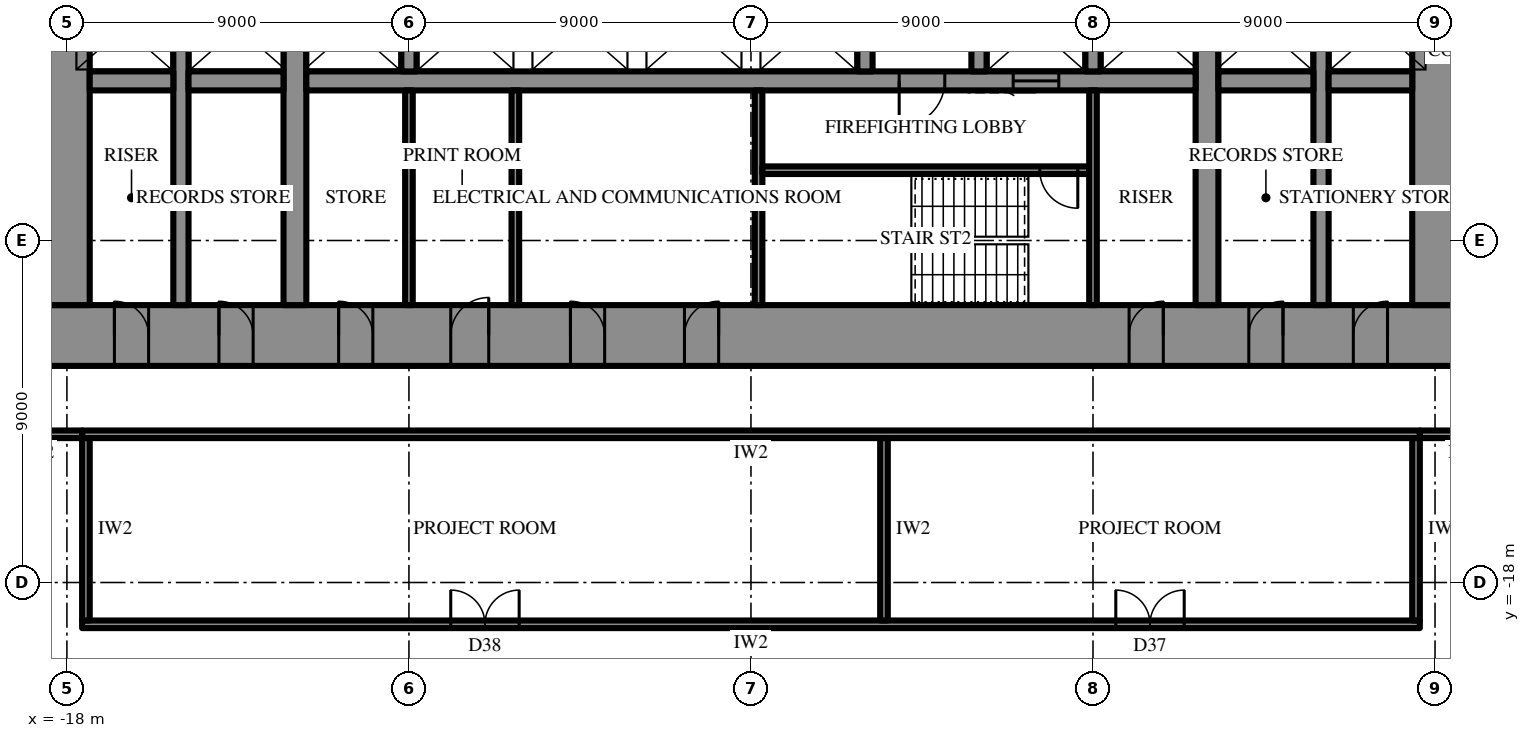
"""IFC4 building model, lengths in metres.
Left out: names, types, materials, properties, quantities, classifications, styles, units other than length and angle.
Written with IfcOpenShell. Run it as: python <this file> out.ifc"""

import sys

from ifc_helpers import new_model, si_unit, direction, frame, frame_2d, origin, place, context, subcontext, project, spatial, rectangle, extrude, element, fill, save


model = new_model("IFC4")
c1 = context("Model", 3, precision=1e-05, world=origin(), true_north=direction((0.0, 1.0)))
c2 = subcontext(c1, "Body", "Model", "MODEL_VIEW")
j1 = project(units=[si_unit("LENGTHUNIT", "METRE"), si_unit("PLANEANGLEUNIT", "RADIAN")], contexts=[c1])
p1 = place(None, origin())
s1 = spatial("IfcSite", under=j1, at=p1, CompositionType="ELEMENT")
p2 = place(p1, origin())
s2 = spatial("IfcBuilding", under=s1, at=p2, CompositionType="ELEMENT")
p3 = place(p2, frame((0.0, 0.0, 23.5)))
s3 = spatial("IfcBuildingStorey", under=s2, at=p3, CompositionType="ELEMENT", Elevation=23.5)
p4 = place(p3, frame((18.6, -11.5, 0.0), z_axis=(0.0, 0.0, 1.0), x_axis=(-1.0, 0.0, 0.0)))
e1 = element("IfcWall", 1, at=p4, inside=s3, PredefinedType="SHEAR", context=c2, shape_type="SweptSolid", body=[
    extrude(rectangle(XDim=37.2, YDim=1.6, at=frame_2d((18.6, 0.0))), origin(), (0.0, 0.0, 1.0), 4.2),
])
p5 = place(p4, frame((19.45, 0.0, 0.0)))
e2 = element("IfcOpeningElement", 2, at=p5, cuts=e1, PredefinedType="OPENING", context=c2, shape_type="SweptSolid", body=[
    extrude(rectangle(XDim=0.9, YDim=2.2, at=frame_2d((0.45, 1.1))), frame((0.0, 0.81, 0.0), z_axis=(0.0, -1.0, 0.0), x_axis=(1.0, 0.0, 0.0)), (0.0, 0.0, 1.0), 1.62),
])
p6 = place(p4, frame((22.45, 0.0, 0.0)))
e3 = element("IfcOpeningElement", 3, at=p6, cuts=e1, PredefinedType="OPENING", context=c2, shape_type="SweptSolid", body=[
    extrude(rectangle(XDim=0.9, YDim=2.2, at=frame_2d((0.45, 1.1))), frame((0.0, 0.81, 0.0), z_axis=(0.0, -1.0, 0.0), x_axis=(1.0, 0.0, 0.0)), (0.0, 0.0, 1.0), 1.62),
])
p7 = place(p4, frame((25.5, 0.0, 0.0)))
e4 = element("IfcOpeningElement", 4, at=p7, cuts=e1, PredefinedType="OPENING", context=c2, shape_type="SweptSolid", body=[
    extrude(rectangle(XDim=1.0, YDim=2.2, at=frame_2d((0.5, 1.1))), frame((0.0, 0.81, 0.0), z_axis=(0.0, -1.0, 0.0), x_axis=(1.0, 0.0, 0.0)), (0.0, 0.0, 1.0), 1.62),
])
p8 = place(p4, frame((1.85, 0.0, 0.0)))
e5 = element("IfcOpeningElement", 5, at=p8, cuts=e1, PredefinedType="OPENING", context=c2, shape_type="SweptSolid", body=[
    extrude(rectangle(XDim=0.9, YDim=2.2, at=frame_2d((0.45, 1.1))), frame((0.0, 0.81, 0.0), z_axis=(0.0, -1.0, 0.0), x_axis=(1.0, 0.0, 0.0)), (0.0, 0.0, 1.0), 1.62),
])
p9 = place(p4, frame((4.6, 0.0, 0.0)))
e6 = element("IfcOpeningElement", 6, at=p9, cuts=e1, PredefinedType="OPENING", context=c2, shape_type="SweptSolid", body=[
    extrude(rectangle(XDim=0.9, YDim=2.2, at=frame_2d((0.45, 1.1))), frame((0.0, 0.81, 0.0), z_axis=(0.0, -1.0, 0.0), x_axis=(1.0, 0.0, 0.0)), (0.0, 0.0, 1.0), 1.62),
])
p10 = place(p4, frame((7.75, 0.0, 0.0)))
e7 = element("IfcOpeningElement", 7, at=p10, cuts=e1, PredefinedType="OPENING", context=c2, shape_type="SweptSolid", body=[
    extrude(rectangle(XDim=0.9, YDim=2.2, at=frame_2d((0.45, 1.1))), frame((0.0, 0.81, 0.0), z_axis=(0.0, -1.0, 0.0), x_axis=(1.0, 0.0, 0.0)), (0.0, 0.0, 1.0), 1.62),
])
p11 = place(p4, frame((28.55, 0.0, 0.0)))
e8 = element("IfcOpeningElement", 8, at=p11, cuts=e1, PredefinedType="OPENING", context=c2, shape_type="SweptSolid", body=[
    extrude(rectangle(XDim=0.9, YDim=2.2, at=frame_2d((0.45, 1.1))), frame((0.0, 0.81, 0.0), z_axis=(0.0, -1.0, 0.0), x_axis=(1.0, 0.0, 0.0)), (0.0, 0.0, 1.0), 1.62),
])
p12 = place(p4, frame((31.7, 0.0, 0.0)))
e9 = element("IfcOpeningElement", 9, at=p12, cuts=e1, PredefinedType="OPENING", context=c2, shape_type="SweptSolid", body=[
    extrude(rectangle(XDim=0.9, YDim=2.2, at=frame_2d((0.45, 1.1))), frame((0.0, 0.81, 0.0), z_axis=(0.0, -1.0, 0.0), x_axis=(1.0, 0.0, 0.0)), (0.0, 0.0, 1.0), 1.62),
])
p13 = place(p4, frame((34.45, 0.0, 0.0)))
e10 = element("IfcOpeningElement", 10, at=p13, cuts=e1, PredefinedType="OPENING", context=c2, shape_type="SweptSolid", body=[
    extrude(rectangle(XDim=0.9, YDim=2.2, at=frame_2d((0.45, 1.1))), frame((0.0, 0.81, 0.0), z_axis=(0.0, -1.0, 0.0), x_axis=(1.0, 0.0, 0.0)), (0.0, 0.0, 1.0), 1.62),
])
p14 = place(p3, frame((18.0, -10.7, 0.0), z_axis=(0.0, 0.0, 1.0), x_axis=(0.0, 1.0, 0.0)))
e11 = element("IfcWall", 11, at=p14, inside=s3, PredefinedType="SHEAR", context=c2, shape_type="SweptSolid", body=[
    extrude(rectangle(XDim=21.4, YDim=1.2, at=frame_2d((10.7, 0.0))), origin(), (0.0, 0.0, 1.0), 4.2),
])
p15 = place(p14, frame((9.8, 0.0, 0.0)))
e12 = element("IfcOpeningElement", 12, at=p15, cuts=e11, PredefinedType="OPENING", context=c2, shape_type="SweptSolid", body=[
    extrude(rectangle(XDim=1.8, YDim=2.4, at=frame_2d((0.9, 1.2))), frame((0.0, 0.61, 0.0), z_axis=(0.0, -1.0, 0.0), x_axis=(1.0, 0.0, 0.0)), (0.0, 0.0, 1.0), 1.22),
])
p16 = place(p3, frame((-18.0, 10.7, 0.0), z_axis=(0.0, 0.0, 1.0), x_axis=(0.0, -1.0, 0.0)))
e13 = element("IfcWall", 13, at=p16, inside=s3, PredefinedType="SHEAR", context=c2, shape_type="SweptSolid", body=[
    extrude(rectangle(XDim=21.4, YDim=1.2, at=frame_2d((10.7, 0.0))), origin(), (0.0, 0.0, 1.0), 4.2),
])
p17 = place(p16, frame((9.8, 0.0, 0.0)))
e14 = element("IfcOpeningElement", 14, at=p17, cuts=e13, PredefinedType="OPENING", context=c2, shape_type="SweptSolid", body=[
    extrude(rectangle(XDim=1.8, YDim=2.4, at=frame_2d((0.9, 1.2))), frame((0.0, 0.61, 0.0), z_axis=(0.0, -1.0, 0.0), x_axis=(1.0, 0.0, 0.0)), (0.0, 0.0, 1.0), 1.22),
])
p18 = place(p3, frame((12.0, -10.7, 0.0), z_axis=(0.0, 0.0, 1.0), x_axis=(0.0, 1.0, 0.0)))
e15 = element("IfcWall", 15, at=p18, inside=s3, PredefinedType="SHEAR", context=c2, shape_type="SweptSolid", body=[
    extrude(rectangle(XDim=21.4, YDim=0.6, at=frame_2d((10.7, 0.0))), origin(), (0.0, 0.0, 1.0), 4.2),
])
p19 = place(p18, frame((9.8, 0.0, 0.0)))
e16 = element("IfcOpeningElement", 16, at=p19, cuts=e15, PredefinedType="OPENING", context=c2, shape_type="SweptSolid", body=[
    extrude(rectangle(XDim=1.8, YDim=2.4, at=frame_2d((0.9, 1.2))), frame((0.0, 0.31, 0.0), z_axis=(0.0, -1.0, 0.0), x_axis=(1.0, 0.0, 0.0)), (0.0, 0.0, 1.0), 0.62),
])
p20 = place(p3, frame((-12.0, -10.7, 0.0), z_axis=(0.0, 0.0, 1.0), x_axis=(0.0, 1.0, 0.0)))
e17 = element("IfcWall", 17, at=p20, inside=s3, PredefinedType="SHEAR", context=c2, shape_type="SweptSolid", body=[
    extrude(rectangle(XDim=21.4, YDim=0.6, at=frame_2d((10.7, 0.0))), origin(), (0.0, 0.0, 1.0), 4.2),
])
p21 = place(p20, frame((9.8, 0.0, 0.0)))
e18 = element("IfcOpeningElement", 18, at=p21, cuts=e17, PredefinedType="OPENING", context=c2, shape_type="SweptSolid", body=[
    extrude(rectangle(XDim=1.8, YDim=2.4, at=frame_2d((0.9, 1.2))), frame((0.0, 0.31, 0.0), z_axis=(0.0, -1.0, 0.0), x_axis=(1.0, 0.0, 0.0)), (0.0, 0.0, 1.0), 0.62),
])
p22 = place(p3, frame((15.0, -10.7, 0.0), z_axis=(0.0, 0.0, 1.0), x_axis=(0.0, 1.0, 0.0)))
e19 = element("IfcWall", 19, at=p22, inside=s3, PredefinedType="SHEAR", context=c2, shape_type="SweptSolid", body=[
    extrude(rectangle(XDim=21.4, YDim=0.4, at=frame_2d((10.7, 0.0))), origin(), (0.0, 0.0, 1.0), 4.2),
])
p23 = place(p22, frame((9.8, 0.0, 0.0)))
e20 = element("IfcOpeningElement", 20, at=p23, cuts=e19, PredefinedType="OPENING", context=c2, shape_type="SweptSolid", body=[
    extrude(rectangle(XDim=1.8, YDim=2.4, at=frame_2d((0.9, 1.2))), frame((0.0, 0.21, 0.0), z_axis=(0.0, -1.0, 0.0), x_axis=(1.0, 0.0, 0.0)), (0.0, 0.0, 1.0), 0.42),
])
p24 = place(p3, frame((-15.0, -10.7, 0.0), z_axis=(0.0, 0.0, 1.0), x_axis=(0.0, 1.0, 0.0)))
e21 = element("IfcWall", 21, at=p24, inside=s3, PredefinedType="SHEAR", context=c2, shape_type="SweptSolid", body=[
    extrude(rectangle(XDim=21.4, YDim=0.4, at=frame_2d((10.7, 0.0))), origin(), (0.0, 0.0, 1.0), 4.2),
])
p25 = place(p24, frame((9.8, 0.0, 0.0)))
e22 = element("IfcOpeningElement", 22, at=p25, cuts=e21, PredefinedType="OPENING", context=c2, shape_type="SweptSolid", body=[
    extrude(rectangle(XDim=1.8, YDim=2.4, at=frame_2d((0.9, 1.2))), frame((0.0, 0.21, 0.0), z_axis=(0.0, -1.0, 0.0), x_axis=(1.0, 0.0, 0.0)), (0.0, 0.0, 1.0), 0.42),
])
p26 = place(p3, frame((17.4, -4.8, 0.0), z_axis=(0.0, 0.0, 1.0), x_axis=(-1.0, 0.0, 0.0)))
e23 = element("IfcWall", 23, at=p26, inside=s3, PredefinedType="SHEAR", context=c2, shape_type="SweptSolid", body=[
    extrude(rectangle(XDim=2.2, YDim=0.5, at=frame_2d((1.1, 0.0))), origin(), (0.0, 0.0, 1.0), 4.2),
])
p27 = place(p3, frame((14.8, -4.8, 0.0), z_axis=(0.0, 0.0, 1.0), x_axis=(-1.0, 0.0, 0.0)))
e24 = element("IfcWall", 24, at=p27, inside=s3, PredefinedType="SHEAR", context=c2, shape_type="SweptSolid", body=[
    extrude(rectangle(XDim=2.5, YDim=0.5, at=frame_2d((1.25, 0.0))), origin(), (0.0, 0.0, 1.0), 4.2),
])
p28 = place(p3, frame((11.7, -4.8, 0.0), z_axis=(0.0, 0.0, 1.0), x_axis=(-1.0, 0.0, 0.0)))
e25 = element("IfcWall", 25, at=p28, inside=s3, PredefinedType="SHEAR", context=c2, shape_type="SweptSolid", body=[
    extrude(rectangle(XDim=23.4, YDim=0.5, at=frame_2d((11.7, 0.0))), origin(), (0.0, 0.0, 1.0), 4.2),
])
p29 = place(p28, frame((6.6, 0.0, 0.0)))
e26 = element("IfcOpeningElement", 26, at=p29, cuts=e25, PredefinedType="OPENING", context=c2, shape_type="SweptSolid", body=[
    extrude(rectangle(XDim=1.2, YDim=2.2, at=frame_2d((0.6, 1.1))), frame((0.0, 0.26, 0.0), z_axis=(0.0, -1.0, 0.0), x_axis=(1.0, 0.0, 0.0)), (0.0, 0.0, 1.0), 0.52),
])
p30 = place(p28, frame((3.6, 0.0, 0.0)))
e27 = element("IfcOpeningElement", 27, at=p30, cuts=e25, PredefinedType="OPENING", context=c2, shape_type="SweptSolid", body=[
    extrude(rectangle(XDim=1.2, YDim=2.2, at=frame_2d((0.6, 1.1))), frame((0.0, 0.26, 0.0), z_axis=(0.0, -1.0, 0.0), x_axis=(1.0, 0.0, 0.0)), (0.0, 0.0, 1.0), 0.52),
])
p31 = place(p3, frame((-12.3, -4.8, 0.0), z_axis=(0.0, 0.0, 1.0), x_axis=(-1.0, 0.0, 0.0)))
e28 = element("IfcWall", 28, at=p31, inside=s3, PredefinedType="SHEAR", context=c2, shape_type="SweptSolid", body=[
    extrude(rectangle(XDim=2.5, YDim=0.5, at=frame_2d((1.25, 0.0))), origin(), (0.0, 0.0, 1.0), 4.2),
])
p32 = place(p3, frame((-15.2, -4.8, 0.0), z_axis=(0.0, 0.0, 1.0), x_axis=(-1.0, 0.0, 0.0)))
e29 = element("IfcWall", 29, at=p32, inside=s3, PredefinedType="SHEAR", context=c2, shape_type="SweptSolid", body=[
    extrude(rectangle(XDim=2.2, YDim=0.5, at=frame_2d((1.1, 0.0))), origin(), (0.0, 0.0, 1.0), 4.2),
])
for number, where, z_axis, x_axis in (
    (30, (9.0, -2.25, 0.0), (0.0, 0.0, 1.0), (0.0, -1.0, 0.0)),
    (31, (6.0, -2.25, 0.0), (0.0, 0.0, 1.0), (0.0, -1.0, 0.0)),
    (32, (3.0, -2.25, 0.0), (0.0, 0.0, 1.0), (0.0, -1.0, 0.0)),
    (33, (-9.0, -2.25, 0.0), (0.0, 0.0, 1.0), (0.0, -1.0, 0.0)),
):
    element("IfcWall", number, at=place(p3, frame(where, z_axis=z_axis, x_axis=x_axis)), inside=s3, PredefinedType="SHEAR", context=c2, shape_type="SweptSolid", body=[
        extrude(rectangle(XDim=2.3, YDim=0.4, at=frame_2d((1.15, 0.0))), origin(), (0.0, 0.0, 1.0), 4.2),
    ])
p33 = place(p3, frame((0.2, -5.05, 0.0), z_axis=(0.0, 0.0, 1.0), x_axis=(0.0, -1.0, 0.0)))
e34 = element("IfcWall", 34, at=p33, inside=s3, PredefinedType="SHEAR", context=c2, shape_type="SweptSolid", body=[
    extrude(rectangle(XDim=5.65, YDim=0.2, at=frame_2d((2.825, 0.0))), origin(), (0.0, 0.0, 1.0), 4.2),
])
p34 = place(p3, frame((8.9, -7.15, 0.0), z_axis=(0.0, 0.0, 1.0), x_axis=(-1.0, 0.0, 0.0)))
e35 = element("IfcWall", 35, at=p34, inside=s3, PredefinedType="SHEAR", context=c2, shape_type="SweptSolid", body=[
    extrude(rectangle(XDim=8.6, YDim=0.2, at=frame_2d((4.3, 0.0))), origin(), (0.0, 0.0, 1.0), 4.2),
])
p35 = place(p34, frame((0.3, 0.0, 0.0)))
e36 = element("IfcOpeningElement", 36, at=p35, cuts=e35, PredefinedType="OPENING", context=c2, shape_type="SweptSolid", body=[
    extrude(rectangle(XDim=1.0, YDim=2.2, at=frame_2d((0.5, 1.1))), frame((0.0, 0.11, 0.0), z_axis=(0.0, -1.0, 0.0), x_axis=(1.0, 0.0, 0.0)), (0.0, 0.0, 1.0), 0.22),
])
for number, where, z_axis, x_axis in (
    (37, (9.0, -5.05, 0.0), (0.0, 0.0, 1.0), (0.0, -1.0, 0.0)),
    (38, (-9.0, -5.05, 0.0), (0.0, 0.0, 1.0), (0.0, -1.0, 0.0)),
    (39, (-6.2, -5.05, 0.0), (0.0, 0.0, 1.0), (0.0, -1.0, 0.0)),
):
    element("IfcWall", number, at=place(p3, frame(where, z_axis=z_axis, x_axis=x_axis)), inside=s3, PredefinedType="PARTITIONING", context=c2, shape_type="SweptSolid", body=[
        extrude(rectangle(XDim=5.65, YDim=0.2, at=frame_2d((2.825, 0.0))), origin(), (0.0, 0.0, 1.0), 4.0),
    ])
p36 = place(p3, frame((17.6, -14.1, 0.0), z_axis=(0.0, 0.0, 1.0), x_axis=(-1.0, 0.0, 0.0)))
e40 = element("IfcWall", 40, at=p36, inside=s3, PredefinedType="PARTITIONING", context=c2, shape_type="SweptSolid", body=[
    extrude(rectangle(XDim=35.2, YDim=0.2, at=frame_2d((17.6, 0.0))), origin(), (0.0, 0.0, 1.0), 4.0),
])
p37 = place(p3, frame((17.6, -19.1, 0.0), z_axis=(0.0, 0.0, 1.0), x_axis=(-1.0, 0.0, 0.0)))
e41 = element("IfcWall", 41, at=p37, inside=s3, PredefinedType="PARTITIONING", context=c2, shape_type="SweptSolid", body=[
    extrude(rectangle(XDim=35.2, YDim=0.2, at=frame_2d((17.6, 0.0))), origin(), (0.0, 0.0, 1.0), 4.0),
])
p38 = place(p37, frame((6.2, 0.0, 0.0)))
e42 = element("IfcOpeningElement", 42, at=p38, cuts=e41, PredefinedType="OPENING", context=c2, shape_type="SweptSolid", body=[
    extrude(rectangle(XDim=1.8, YDim=2.4, at=frame_2d((0.9, 1.2))), frame((0.0, 0.11, 0.0), z_axis=(0.0, -1.0, 0.0), x_axis=(1.0, 0.0, 0.0)), (0.0, 0.0, 1.0), 0.22),
])
p39 = place(p37, frame((23.7, 0.0, 0.0)))
e43 = element("IfcOpeningElement", 43, at=p39, cuts=e41, PredefinedType="OPENING", context=c2, shape_type="SweptSolid", body=[
    extrude(rectangle(XDim=1.8, YDim=2.4, at=frame_2d((0.9, 1.2))), frame((0.0, 0.11, 0.0), z_axis=(0.0, -1.0, 0.0), x_axis=(1.0, 0.0, 0.0)), (0.0, 0.0, 1.0), 0.22),
])
for number, where, z_axis, x_axis in (
    (44, (17.5, -14.2, 0.0), (0.0, 0.0, 1.0), (0.0, -1.0, 0.0)),
    (45, (3.5, -14.2, 0.0), (0.0, 0.0, 1.0), (0.0, -1.0, 0.0)),
    (46, (-17.5, -14.2, 0.0), (0.0, 0.0, 1.0), (0.0, -1.0, 0.0)),
):
    element("IfcWall", number, at=place(p3, frame(where, z_axis=z_axis, x_axis=x_axis)), inside=s3, PredefinedType="PARTITIONING", context=c2, shape_type="SweptSolid", body=[
        extrude(rectangle(XDim=4.8, YDim=0.2, at=frame_2d((2.4, 0.0))), origin(), (0.0, 0.0, 1.0), 4.0),
    ])
for number, where, z_axis, x_axis in (
    (47, (-17.6, -14.1, 0.0), (0.0, 0.0, 1.0), (-1.0, 0.0, 0.0)),
    (48, (20.0, -14.1, 0.0), (0.0, 0.0, 1.0), (-1.0, 0.0, 0.0)),
):
    element("IfcWall", number, at=place(p3, frame(where, z_axis=z_axis, x_axis=x_axis)), inside=s3, PredefinedType="PARTITIONING", context=c2, shape_type="SweptSolid", body=[
        extrude(rectangle(XDim=2.4, YDim=0.2, at=frame_2d((1.2, 0.0))), origin(), (0.0, 0.0, 1.0), 4.0),
    ])
p40 = place(p29, origin())
e49 = element("IfcDoor", 49, at=p40, inside=s3, OperationType="SINGLE_SWING_LEFT", PredefinedType="DOOR", context=c2, shape_type="SweptSolid", body=[
    extrude(rectangle(XDim=1.2, YDim=2.2, at=frame_2d((0.6, 1.1))), frame((0.0, 0.025, 0.0), z_axis=(0.0, -1.0, 0.0), x_axis=(1.0, 0.0, 0.0)), (0.0, 0.0, 1.0), 0.05),
])
fill(e26, e49)
p41 = place(p35, origin())
e50 = element("IfcDoor", 50, at=p41, inside=s3, OperationType="SINGLE_SWING_RIGHT", PredefinedType="DOOR", context=c2, shape_type="SweptSolid", body=[
    extrude(rectangle(XDim=1.0, YDim=2.2, at=frame_2d((0.5, 1.1))), frame((0.0, 0.025, 0.0), z_axis=(0.0, -1.0, 0.0), x_axis=(1.0, 0.0, 0.0)), (0.0, 0.0, 1.0), 0.05),
])
fill(e36, e50)
p42 = place(p5, frame((0.9, 0.0, 0.0), z_axis=(0.0, 0.0, 1.0), x_axis=(-1.0, 0.0, 0.0)))
e51 = element("IfcDoor", 51, at=p42, inside=s3, OperationType="SINGLE_SWING_LEFT", PredefinedType="DOOR", context=c2, shape_type="SweptSolid", body=[
    extrude(rectangle(XDim=0.9, YDim=2.2, at=frame_2d((0.45, 1.1))), frame((0.0, 0.025, 0.0), z_axis=(0.0, -1.0, 0.0), x_axis=(1.0, 0.0, 0.0)), (0.0, 0.0, 1.0), 0.05),
])
fill(e2, e51)
p43 = place(p6, frame((0.9, 0.0, 0.0), z_axis=(0.0, 0.0, 1.0), x_axis=(-1.0, 0.0, 0.0)))
e52 = element("IfcDoor", 52, at=p43, inside=s3, OperationType="SINGLE_SWING_RIGHT", PredefinedType="DOOR", context=c2, shape_type="SweptSolid", body=[
    extrude(rectangle(XDim=0.9, YDim=2.2, at=frame_2d((0.45, 1.1))), frame((0.0, 0.025, 0.0), z_axis=(0.0, -1.0, 0.0), x_axis=(1.0, 0.0, 0.0)), (0.0, 0.0, 1.0), 0.05),
])
fill(e3, e52)
p44 = place(p7, frame((1.0, 0.0, 0.0), z_axis=(0.0, 0.0, 1.0), x_axis=(-1.0, 0.0, 0.0)))
e53 = element("IfcDoor", 53, at=p44, inside=s3, OperationType="SINGLE_SWING_LEFT", PredefinedType="DOOR", context=c2, shape_type="SweptSolid", body=[
    extrude(rectangle(XDim=1.0, YDim=2.2, at=frame_2d((0.5, 1.1))), frame((0.0, 0.025, 0.0), z_axis=(0.0, -1.0, 0.0), x_axis=(1.0, 0.0, 0.0)), (0.0, 0.0, 1.0), 0.05),
])
fill(e4, e53)
p45 = place(p8, frame((0.9, 0.0, 0.0), z_axis=(0.0, 0.0, 1.0), x_axis=(-1.0, 0.0, 0.0)))
e54 = element("IfcDoor", 54, at=p45, inside=s3, OperationType="SINGLE_SWING_LEFT", PredefinedType="DOOR", context=c2, shape_type="SweptSolid", body=[
    extrude(rectangle(XDim=0.9, YDim=2.2, at=frame_2d((0.45, 1.1))), frame((0.0, 0.025, 0.0), z_axis=(0.0, -1.0, 0.0), x_axis=(1.0, 0.0, 0.0)), (0.0, 0.0, 1.0), 0.05),
])
fill(e5, e54)
p46 = place(p9, frame((0.9, 0.0, 0.0), z_axis=(0.0, 0.0, 1.0), x_axis=(-1.0, 0.0, 0.0)))
e55 = element("IfcDoor", 55, at=p46, inside=s3, OperationType="SINGLE_SWING_LEFT", PredefinedType="DOOR", context=c2, shape_type="SweptSolid", body=[
    extrude(rectangle(XDim=0.9, YDim=2.2, at=frame_2d((0.45, 1.1))), frame((0.0, 0.025, 0.0), z_axis=(0.0, -1.0, 0.0), x_axis=(1.0, 0.0, 0.0)), (0.0, 0.0, 1.0), 0.05),
])
fill(e6, e55)
p47 = place(p10, frame((0.9, 0.0, 0.0), z_axis=(0.0, 0.0, 1.0), x_axis=(-1.0, 0.0, 0.0)))
e56 = element("IfcDoor", 56, at=p47, inside=s3, OperationType="SINGLE_SWING_LEFT", PredefinedType="DOOR", context=c2, shape_type="SweptSolid", body=[
    extrude(rectangle(XDim=0.9, YDim=2.2, at=frame_2d((0.45, 1.1))), frame((0.0, 0.025, 0.0), z_axis=(0.0, -1.0, 0.0), x_axis=(1.0, 0.0, 0.0)), (0.0, 0.0, 1.0), 0.05),
])
fill(e7, e56)
p48 = place(p11, frame((0.9, 0.0, 0.0), z_axis=(0.0, 0.0, 1.0), x_axis=(-1.0, 0.0, 0.0)))
e57 = element("IfcDoor", 57, at=p48, inside=s3, OperationType="SINGLE_SWING_RIGHT", PredefinedType="DOOR", context=c2, shape_type="SweptSolid", body=[
    extrude(rectangle(XDim=0.9, YDim=2.2, at=frame_2d((0.45, 1.1))), frame((0.0, 0.025, 0.0), z_axis=(0.0, -1.0, 0.0), x_axis=(1.0, 0.0, 0.0)), (0.0, 0.0, 1.0), 0.05),
])
fill(e8, e57)
p49 = place(p12, frame((0.9, 0.0, 0.0), z_axis=(0.0, 0.0, 1.0), x_axis=(-1.0, 0.0, 0.0)))
e58 = element("IfcDoor", 58, at=p49, inside=s3, OperationType="SINGLE_SWING_RIGHT", PredefinedType="DOOR", context=c2, shape_type="SweptSolid", body=[
    extrude(rectangle(XDim=0.9, YDim=2.2, at=frame_2d((0.45, 1.1))), frame((0.0, 0.025, 0.0), z_axis=(0.0, -1.0, 0.0), x_axis=(1.0, 0.0, 0.0)), (0.0, 0.0, 1.0), 0.05),
])
fill(e9, e58)
p50 = place(p13, frame((0.9, 0.0, 0.0), z_axis=(0.0, 0.0, 1.0), x_axis=(-1.0, 0.0, 0.0)))
e59 = element("IfcDoor", 59, at=p50, inside=s3, OperationType="SINGLE_SWING_RIGHT", PredefinedType="DOOR", context=c2, shape_type="SweptSolid", body=[
    extrude(rectangle(XDim=0.9, YDim=2.2, at=frame_2d((0.45, 1.1))), frame((0.0, 0.025, 0.0), z_axis=(0.0, -1.0, 0.0), x_axis=(1.0, 0.0, 0.0)), (0.0, 0.0, 1.0), 0.05),
])
fill(e10, e59)
p51 = place(p30, origin())
e60 = element("IfcDoor", 60, at=p51, inside=s3, OperationType="SLIDING_TO_LEFT", PredefinedType="DOOR", context=c2, shape_type="SweptSolid", body=[
    extrude(rectangle(XDim=1.2, YDim=2.2, at=frame_2d((0.6, 1.1))), frame((0.0, 0.025, 0.0), z_axis=(0.0, -1.0, 0.0), x_axis=(1.0, 0.0, 0.0)), (0.0, 0.0, 1.0), 0.05),
])
fill(e27, e60)
p52 = place(p38, frame((1.8, 0.0, 0.0), z_axis=(0.0, 0.0, 1.0), x_axis=(-1.0, 0.0, 0.0)))
e61 = element("IfcDoor", 61, at=p52, inside=s3, OperationType="DOUBLE_DOOR_SINGLE_SWING", PredefinedType="DOOR", context=c2, shape_type="SweptSolid", body=[
    extrude(rectangle(XDim=1.8, YDim=2.4, at=frame_2d((0.9, 1.2))), frame((0.0, 0.025, 0.0), z_axis=(0.0, -1.0, 0.0), x_axis=(1.0, 0.0, 0.0)), (0.0, 0.0, 1.0), 0.05),
])
fill(e42, e61)
p53 = place(p39, frame((1.8, 0.0, 0.0), z_axis=(0.0, 0.0, 1.0), x_axis=(-1.0, 0.0, 0.0)))
e62 = element("IfcDoor", 62, at=p53, inside=s3, OperationType="DOUBLE_DOOR_SINGLE_SWING", PredefinedType="DOOR", context=c2, shape_type="SweptSolid", body=[
    extrude(rectangle(XDim=1.8, YDim=2.4, at=frame_2d((0.9, 1.2))), frame((0.0, 0.025, 0.0), z_axis=(0.0, -1.0, 0.0), x_axis=(1.0, 0.0, 0.0)), (0.0, 0.0, 1.0), 0.05),
])
fill(e43, e62)
save(model, sys.argv[1])
